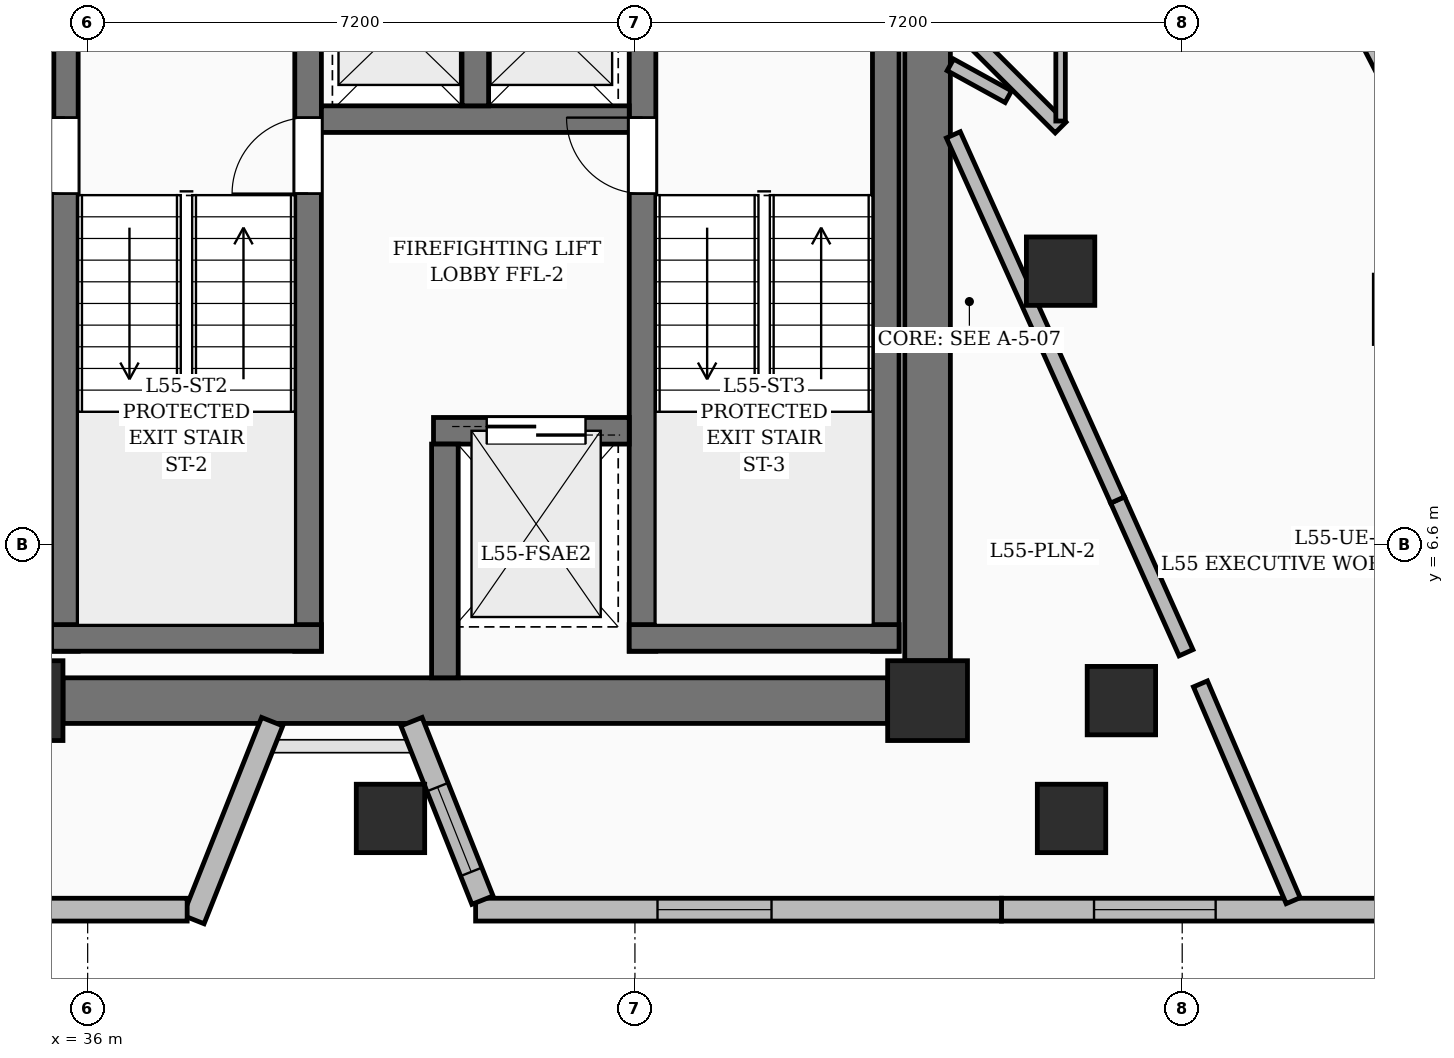
"""IFC4 building model, lengths in metres.
Left out: names, types, materials, properties, quantities, classifications, styles, units other than length and angle.
Written with IfcOpenShell. Run it as: python <this file> out.ifc"""

import sys

from ifc_helpers import new_model, si_unit, direction, frame, frame_2d, origin, origin_2d, place, context, subcontext, project, spatial, rectangle, extrude, element, fill, save


model = new_model("IFC4")
c1 = context("Model", 3, precision=1e-05, world=origin(), true_north=direction((0.0, 1.0)))
c2 = subcontext(c1, "Body", "Model", "MODEL_VIEW")
j1 = project(units=[si_unit("LENGTHUNIT", "METRE"), si_unit("PLANEANGLEUNIT", "RADIAN")], contexts=[c1])
p1 = place(None, origin())
s1 = spatial("IfcSite", under=j1, at=p1, CompositionType="ELEMENT")
p2 = place(p1, origin())
s2 = spatial("IfcBuilding", under=s1, at=p2, CompositionType="ELEMENT")
p3 = place(p2, frame((0.0, 0.0, 214.5)))
s3 = spatial("IfcBuildingStorey", under=s2, at=p3, CompositionType="ELEMENT", Elevation=214.5)
for number, where, z_axis, x_axis in (
    (1, (35.15, 4.55, 0.0), (0.0, 0.0, 1.0), (1.0, 0.0, 0.0)),
    (2, (47.05, 4.55, 0.0), (0.0, 0.0, 1.0), (1.0, 0.0, 0.0)),
):
    element("IfcColumn", number, at=place(p3, frame(where, z_axis=z_axis, x_axis=x_axis)), inside=s3, PredefinedType="COLUMN", context=c2, shape_type="SweptSolid", body=[
        extrude(rectangle(XDim=1.05, YDim=1.05, at=origin_2d()), origin(), (0.0, 0.0, 1.0), 3.75),
    ])
for number, where, z_axis, x_axis in (
    (3, (49.6, 4.55, 0.0), (0.0, 0.0, 1.0), (1.0, 0.0, 0.0)),
    (4, (48.8, 10.2, 0.0), (0.0, 0.0, 1.0), (1.0, 0.0, 0.0)),
):
    element("IfcColumn", number, at=place(p3, frame(where, z_axis=z_axis, x_axis=x_axis)), inside=s3, PredefinedType="COLUMN", context=c2, shape_type="SweptSolid", body=[
        extrude(rectangle(XDim=0.9, YDim=0.9, at=origin_2d()), origin(), (0.0, 0.0, 1.0), 3.75),
    ])
p4 = place(p3, frame((35.675, 4.55, 0.0), z_axis=(0.0, 0.0, 1.0), x_axis=(1.0, 0.0, 0.0)))
e5 = element("IfcWall", 5, at=p4, inside=s3, PredefinedType="SHEAR", context=c2, shape_type="SweptSolid", body=[
    extrude(rectangle(XDim=10.85, YDim=0.6, at=frame_2d((5.425, 0.0))), origin(), (0.0, 0.0, 1.0), 3.75),
])
p5 = place(p3, frame((47.05, 5.075, 0.0), z_axis=(0.0, 0.0, 1.0), x_axis=(0.0, 1.0, 0.0)))
e6 = element("IfcWall", 6, at=p5, inside=s3, PredefinedType="SHEAR", context=c2, shape_type="SweptSolid", body=[
    extrude(rectangle(XDim=9.15, YDim=0.6, at=frame_2d((4.575, 0.0))), origin(), (0.0, 0.0, 1.0), 3.75),
])
p6 = place(p3, frame((35.7, 5.2, 0.0), z_axis=(0.0, 0.0, 1.0), x_axis=(0.0, 1.0, 0.0)))
e7 = element("IfcWall", 7, at=p6, inside=s3, PredefinedType="SOLIDWALL", context=c2, shape_type="SweptSolid", body=[
    extrude(rectangle(XDim=9.25, YDim=0.35, at=frame_2d((4.625, 0.0))), origin(), (0.0, 0.0, 1.0), 3.75),
])
p7 = place(p6, frame((6.02, 0.0, 0.0)))
e8 = element("IfcOpeningElement", 8, at=p7, cuts=e7, PredefinedType="OPENING", context=c2, shape_type="SweptSolid", body=[
    extrude(rectangle(XDim=1.0, YDim=2.15, at=frame_2d((0.5, 1.075))), frame((0.0, 0.185, 0.0), z_axis=(0.0, -1.0, 0.0), x_axis=(1.0, 0.0, 0.0)), (0.0, 0.0, 1.0), 0.37),
])
p8 = place(p3, frame((38.9, 5.2, 0.0), z_axis=(0.0, 0.0, 1.0), x_axis=(0.0, 1.0, 0.0)))
e9 = element("IfcWall", 9, at=p8, inside=s3, PredefinedType="SOLIDWALL", context=c2, shape_type="SweptSolid", body=[
    extrude(rectangle(XDim=9.25, YDim=0.35, at=frame_2d((4.625, 0.0))), origin(), (0.0, 0.0, 1.0), 3.75),
])
p9 = place(p8, frame((6.02, 0.0, 0.0)))
e10 = element("IfcOpeningElement", 10, at=p9, cuts=e9, PredefinedType="OPENING", context=c2, shape_type="SweptSolid", body=[
    extrude(rectangle(XDim=1.0, YDim=2.15, at=frame_2d((0.5, 1.075))), frame((0.0, 0.185, 0.0), z_axis=(0.0, -1.0, 0.0), x_axis=(1.0, 0.0, 0.0)), (0.0, 0.0, 1.0), 0.37),
])
p10 = place(p3, frame((35.525, 5.375, 0.0), z_axis=(0.0, 0.0, 1.0), x_axis=(1.0, 0.0, 0.0)))
e11 = element("IfcWall", 11, at=p10, inside=s3, PredefinedType="SOLIDWALL", context=c2, shape_type="SweptSolid", body=[
    extrude(rectangle(XDim=3.55, YDim=0.35, at=frame_2d((1.775, 0.0))), origin(), (0.0, 0.0, 1.0), 3.75),
])
p11 = place(p3, frame((43.3, 5.2, 0.0), z_axis=(0.0, 0.0, 1.0), x_axis=(0.0, 1.0, 0.0)))
e12 = element("IfcWall", 12, at=p11, inside=s3, PredefinedType="SOLIDWALL", context=c2, shape_type="SweptSolid", body=[
    extrude(rectangle(XDim=9.25, YDim=0.35, at=frame_2d((4.625, 0.0))), origin(), (0.0, 0.0, 1.0), 3.75),
])
p12 = place(p11, frame((6.02, 0.0, 0.0)))
e13 = element("IfcOpeningElement", 13, at=p12, cuts=e12, PredefinedType="OPENING", context=c2, shape_type="SweptSolid", body=[
    extrude(rectangle(XDim=1.0, YDim=2.15, at=frame_2d((0.5, 1.075))), frame((0.0, 0.185, 0.0), z_axis=(0.0, -1.0, 0.0), x_axis=(1.0, 0.0, 0.0)), (0.0, 0.0, 1.0), 0.37),
])
p13 = place(p3, frame((46.5, 5.2, 0.0), z_axis=(0.0, 0.0, 1.0), x_axis=(0.0, 1.0, 0.0)))
e14 = element("IfcWall", 14, at=p13, inside=s3, PredefinedType="SOLIDWALL", context=c2, shape_type="SweptSolid", body=[
    extrude(rectangle(XDim=9.25, YDim=0.35, at=frame_2d((4.625, 0.0))), origin(), (0.0, 0.0, 1.0), 3.75),
])
p14 = place(p3, frame((43.125, 5.375, 0.0), z_axis=(0.0, 0.0, 1.0), x_axis=(1.0, 0.0, 0.0)))
e15 = element("IfcWall", 15, at=p14, inside=s3, PredefinedType="SOLIDWALL", context=c2, shape_type="SweptSolid", body=[
    extrude(rectangle(XDim=3.55, YDim=0.35, at=frame_2d((1.775, 0.0))), origin(), (0.0, 0.0, 1.0), 3.75),
])
p15 = place(p3, frame((40.55, 8.1, 0.0), z_axis=(0.0, 0.0, 1.0), x_axis=(1.0, 0.0, 0.0)))
e16 = element("IfcWall", 16, at=p15, inside=s3, PredefinedType="SOLIDWALL", context=c2, shape_type="SweptSolid", body=[
    extrude(rectangle(XDim=2.575, YDim=0.35, at=frame_2d((1.288, 0.0))), origin(), (0.0, 0.0, 1.0), 3.75),
])
p16 = place(p15, frame((0.7, 0.0, 0.0)))
e17 = element("IfcOpeningElement", 17, at=p16, cuts=e16, PredefinedType="OPENING", context=c2, shape_type="SweptSolid", body=[
    extrude(rectangle(XDim=1.3, YDim=2.25, at=frame_2d((0.65, 1.125))), frame((0.0, 0.185, 0.0), z_axis=(0.0, -1.0, 0.0), x_axis=(1.0, 0.0, 0.0)), (0.0, 0.0, 1.0), 0.37),
])
p17 = place(p3, frame((40.7, 4.85, 0.0), z_axis=(0.0, 0.0, 1.0), x_axis=(0.0, 1.0, 0.0)))
e18 = element("IfcWall", 18, at=p17, inside=s3, PredefinedType="SOLIDWALL", context=c2, shape_type="SweptSolid", body=[
    extrude(rectangle(XDim=3.075, YDim=0.35, at=frame_2d((1.538, 0.0))), origin(), (0.0, 0.0, 1.0), 3.75),
])
p18 = place(p3, frame((39.075, 12.2, 0.0), z_axis=(0.0, 0.0, 1.0), x_axis=(1.0, 0.0, 0.0)))
e19 = element("IfcWall", 19, at=p18, inside=s3, PredefinedType="SOLIDWALL", context=c2, shape_type="SweptSolid", body=[
    extrude(rectangle(XDim=4.05, YDim=0.35, at=frame_2d((2.025, 0.0))), origin(), (0.0, 0.0, 1.0), 3.75),
])
p19 = place(p3, frame((41.1, 12.375, 0.0), z_axis=(0.0, 0.0, 1.0), x_axis=(0.0, 1.0, 0.0)))
e20 = element("IfcWall", 20, at=p19, inside=s3, PredefinedType="SOLIDWALL", context=c2, shape_type="SweptSolid", body=[
    extrude(rectangle(XDim=2.075, YDim=0.35, at=frame_2d((1.038, 0.0))), origin(), (0.0, 0.0, 1.0), 3.75),
])
for number, where, z_axis, x_axis in (
    (21, (39.984, 3.0, 0.0), (0.0, 0.0, 1.0), (1.0, 0.0, 0.0)),
    (22, (48.944, 3.0, 0.0), (0.0, 0.0, 1.0), (1.0, 0.0, 0.0)),
    (23, (53.377, 9.698, 0.0), (0.0, 0.0, 1.0), (1.0, 0.0, 0.0)),
):
    element("IfcColumn", number, at=place(p3, frame(where, z_axis=z_axis, x_axis=x_axis)), inside=s3, PredefinedType="COLUMN", context=c2, shape_type="SweptSolid", body=[
        extrude(rectangle(XDim=0.9, YDim=0.9, at=origin_2d()), origin(), (0.0, 0.0, 1.0), 3.75),
    ])
p20 = place(p3, frame((51.288, 16.369, 0.0), z_axis=(0.0, 0.0, 1.0), x_axis=(0.458306446078, -0.88879424024, 0.0)))
e24 = element("IfcWall", 24, at=p20, inside=s3, PredefinedType="SOLIDWALL", context=c2, shape_type="SweptSolid", body=[
    extrude(rectangle(XDim=6.266, YDim=0.3, at=frame_2d((3.133, 0.0))), origin(), (0.0, 0.0, 1.0), 3.5),
])
p21 = place(p20, frame((2.975, 0.0, 0.55)))
e25 = element("IfcOpeningElement", 25, at=p21, cuts=e24, PredefinedType="OPENING", context=c2, shape_type="SweptSolid", body=[
    extrude(rectangle(XDim=1.6, YDim=2.2, at=frame_2d((0.8, 1.1))), frame((0.0, 0.16, 0.0), z_axis=(0.0, -1.0, 0.0), x_axis=(1.0, 0.0, 0.0)), (0.0, 0.0, 1.0), 0.32),
])
p22 = place(p3, frame((54.36, 1.8, 0.0), z_axis=(0.0, 0.0, 1.0), x_axis=(-1.0, 0.0, 0.0)))
e26 = element("IfcWall", 26, at=p22, inside=s3, PredefinedType="SOLIDWALL", context=c2, shape_type="SweptSolid", body=[
    extrude(rectangle(XDim=6.338, YDim=0.3, at=frame_2d((3.169, 0.0))), origin(), (0.0, 0.0, 1.0), 3.5),
])
p23 = place(p22, frame((3.52, 0.0, 0.55)))
e27 = element("IfcOpeningElement", 27, at=p23, cuts=e26, PredefinedType="OPENING", context=c2, shape_type="SweptSolid", body=[
    extrude(rectangle(XDim=1.6, YDim=2.2, at=frame_2d((0.8, 1.1))), frame((0.0, 0.16, 0.0), z_axis=(0.0, -1.0, 0.0), x_axis=(1.0, 0.0, 0.0)), (0.0, 0.0, 1.0), 0.32),
])
p24 = place(p3, frame((48.022, 1.8, 0.0), z_axis=(0.0, 0.0, 1.0), x_axis=(-1.0, 0.0, 0.0)))
e28 = element("IfcWall", 28, at=p24, inside=s3, PredefinedType="SOLIDWALL", context=c2, shape_type="SweptSolid", body=[
    extrude(rectangle(XDim=6.918, YDim=0.3, at=frame_2d((3.459, 0.0))), origin(), (0.0, 0.0, 1.0), 3.5),
])
p25 = place(p24, frame((3.025, 0.0, 0.6)))
e29 = element("IfcOpeningElement", 29, at=p25, cuts=e28, PredefinedType="OPENING", context=c2, shape_type="SweptSolid", body=[
    extrude(rectangle(XDim=1.5, YDim=2.1, at=frame_2d((0.75, 1.05))), frame((0.0, 0.16, 0.0), z_axis=(0.0, -1.0, 0.0), x_axis=(1.0, 0.0, 0.0)), (0.0, 0.0, 1.0), 0.32),
])
p26 = place(p3, frame((41.194, 1.925, 0.0), z_axis=(0.0, 0.0, 1.0), x_axis=(-0.369457562636, 0.929247603931, 0.0)))
e30 = element("IfcWall", 30, at=p26, inside=s3, PredefinedType="SOLIDWALL", context=c2, shape_type="SweptSolid", body=[
    extrude(rectangle(XDim=2.527, YDim=0.3, at=frame_2d((1.263, 0.0))), origin(), (0.0, 0.0, 1.0), 2.825),
])
p27 = place(p26, frame((0.4, 0.0, 0.8)))
e31 = element("IfcOpeningElement", 31, at=p27, cuts=e30, PredefinedType="OPENING", context=c2, shape_type="SweptSolid", body=[
    extrude(rectangle(XDim=1.2, YDim=1.8, at=frame_2d((0.6, 0.9))), frame((0.0, 0.16, 0.0), z_axis=(0.0, -1.0, 0.0), x_axis=(1.0, 0.0, 0.0)), (0.0, 0.0, 1.0), 0.32),
])
p28 = place(p3, frame((38.427, 4.273, 0.0), z_axis=(0.0, 0.0, 1.0), x_axis=(-0.369466825356, -0.929243921132, 0.0)))
e32 = element("IfcWall", 32, at=p28, inside=s3, PredefinedType="SOLIDWALL", context=c2, shape_type="SweptSolid", body=[
    extrude(rectangle(XDim=2.802, YDim=0.3, at=frame_2d((1.401, 0.0))), origin(), (0.0, 0.0, 1.0), 2.69),
])
p29 = place(p3, frame((37.309, 1.8, 0.0), z_axis=(0.0, 0.0, 1.0), x_axis=(-1.0, 0.0, 0.0)))
e33 = element("IfcWall", 33, at=p29, inside=s3, PredefinedType="SOLIDWALL", context=c2, shape_type="SweptSolid", body=[
    extrude(rectangle(XDim=6.3, YDim=0.3, at=frame_2d((3.15, 0.0))), origin(), (0.0, 0.0, 1.0), 3.5),
])
p30 = place(p29, frame((4.4, 0.0, 0.8)))
e34 = element("IfcOpeningElement", 34, at=p30, cuts=e33, PredefinedType="OPENING", context=c2, shape_type="SweptSolid", body=[
    extrude(rectangle(XDim=1.2, YDim=1.8, at=frame_2d((0.6, 0.9))), frame((0.0, 0.16, 0.0), z_axis=(0.0, -1.0, 0.0), x_axis=(1.0, 0.0, 0.0)), (0.0, 0.0, 1.0), 0.32),
])
p31 = place(p3, frame((35.48, 12.22, 0.0), z_axis=(0.0, 0.0, 1.0), x_axis=(0.0, 1.0, 0.0)))
e35 = element("IfcWall", 35, at=p31, inside=s3, PredefinedType="PARTITIONING", context=c2, shape_type="SweptSolid", body=[
    extrude(rectangle(XDim=2.396, YDim=0.15, at=frame_2d((1.198, 0.0))), origin(), (0.0, 0.0, 1.0), 3.5),
])
p32 = place(p3, frame((50.45, 5.18, 0.0), z_axis=(0.0, 0.0, 1.0), x_axis=(-0.408626143047, 0.912701854506, 0.0)))
e36 = element("IfcWall", 36, at=p32, inside=s3, PredefinedType="PARTITIONING", context=c2, shape_type="SweptSolid", body=[
    extrude(rectangle(XDim=2.202, YDim=0.2, at=frame_2d((1.101, 0.0))), origin(), (0.0, 0.0, 1.0), 2.82),
])
p33 = place(p3, frame((51.86, 1.918, 0.0), z_axis=(0.0, 0.0, 1.0), x_axis=(-0.393349316575, 0.919389098886, 0.0)))
e37 = element("IfcWall", 37, at=p33, inside=s3, PredefinedType="PARTITIONING", context=c2, shape_type="SweptSolid", body=[
    extrude(rectangle(XDim=3.102, YDim=0.2, at=frame_2d((1.551, 0.0))), origin(), (0.0, 0.0, 1.0), 3.5),
])
p34 = place(p3, frame((49.55, 7.19, 0.0), z_axis=(0.0, 0.0, 1.0), x_axis=(-0.410297221829, 0.91195185715, 0.0)))
e38 = element("IfcWall", 38, at=p34, inside=s3, PredefinedType="PARTITIONING", context=c2, shape_type="SweptSolid", body=[
    extrude(rectangle(XDim=5.267, YDim=0.2, at=frame_2d((2.634, 0.0))), origin(), (0.0, 0.0, 1.0), 2.685),
])
p35 = place(p3, frame((48.8, 12.09, 0.0), z_axis=(0.0, 0.0, 1.0), x_axis=(-0.707106781187, 0.707106781187, 0.0)))
e39 = element("IfcWall", 39, at=p35, inside=s3, PredefinedType="PARTITIONING", context=c2, shape_type="SweptSolid", body=[
    extrude(rectangle(XDim=2.051, YDim=0.2, at=frame_2d((1.025, 0.0))), origin(), (0.0, 0.0, 1.0), 3.5),
])
p36 = place(p3, frame((48.8, 12.175, 0.0), z_axis=(0.0, 0.0, 1.0), x_axis=(0.0, 1.0, 0.0)))
e40 = element("IfcWall", 40, at=p36, inside=s3, PredefinedType="PARTITIONING", context=c2, shape_type="SweptSolid", body=[
    extrude(rectangle(XDim=2.415, YDim=0.125, at=frame_2d((1.208, 0.0))), origin(), (0.0, 0.0, 1.0), 2.859),
])
p37 = place(p36, frame((0.979, 0.0, 0.0)))
e41 = element("IfcOpeningElement", 41, at=p37, cuts=e40, PredefinedType="OPENING", context=c2, shape_type="SweptSolid", body=[
    extrude(rectangle(XDim=0.95, YDim=2.2, at=frame_2d((0.475, 1.1))), frame((0.0, 0.072, 0.0), z_axis=(0.0, -1.0, 0.0), x_axis=(1.0, 0.0, 0.0)), (0.0, 0.0, 1.0), 0.145),
])
p38 = place(p3, frame((47.35, 12.914, 0.0), z_axis=(0.0, 0.0, 1.0), x_axis=(0.876281108122, -0.481800186331, 0.0)))
e42 = element("IfcWall", 42, at=p38, inside=s3, PredefinedType="PARTITIONING", context=c2, shape_type="SweptSolid", body=[
    extrude(rectangle(XDim=0.87, YDim=0.175, at=frame_2d((0.435, 0.0))), origin(), (0.0, 0.0, 1.0), 3.5),
])
p39 = place(p21, origin())
e43 = element("IfcWindow", 43, at=p39, inside=s3, PartitioningType="SINGLE_PANEL", PredefinedType="WINDOW", context=c2, shape_type="SweptSolid", body=[
    extrude(rectangle(XDim=1.6, YDim=2.2, at=frame_2d((0.8, 1.1))), frame((0.0, 0.03, 0.0), z_axis=(0.0, -1.0, 0.0), x_axis=(1.0, 0.0, 0.0)), (0.0, 0.0, 1.0), 0.06),
])
fill(e25, e43)
p40 = place(p23, origin())
e44 = element("IfcWindow", 44, at=p40, inside=s3, PartitioningType="SINGLE_PANEL", PredefinedType="WINDOW", context=c2, shape_type="SweptSolid", body=[
    extrude(rectangle(XDim=1.6, YDim=2.2, at=frame_2d((0.8, 1.1))), frame((0.0, 0.03, 0.0), z_axis=(0.0, -1.0, 0.0), x_axis=(1.0, 0.0, 0.0)), (0.0, 0.0, 1.0), 0.06),
])
fill(e27, e44)
p41 = place(p25, origin())
e45 = element("IfcWindow", 45, at=p41, inside=s3, PartitioningType="SINGLE_PANEL", PredefinedType="WINDOW", context=c2, shape_type="SweptSolid", body=[
    extrude(rectangle(XDim=1.5, YDim=2.1, at=frame_2d((0.75, 1.05))), frame((0.0, 0.03, 0.0), z_axis=(0.0, -1.0, 0.0), x_axis=(1.0, 0.0, 0.0)), (0.0, 0.0, 1.0), 0.06),
])
fill(e29, e45)
p42 = place(p27, origin())
e46 = element("IfcWindow", 46, at=p42, inside=s3, PartitioningType="SINGLE_PANEL", PredefinedType="WINDOW", context=c2, shape_type="SweptSolid", body=[
    extrude(rectangle(XDim=1.2, YDim=1.8, at=frame_2d((0.6, 0.9))), frame((0.0, 0.03, 0.0), z_axis=(0.0, -1.0, 0.0), x_axis=(1.0, 0.0, 0.0)), (0.0, 0.0, 1.0), 0.06),
])
fill(e31, e46)
p43 = place(p7, origin())
e47 = element("IfcDoor", 47, at=p43, inside=s3, OperationType="SINGLE_SWING_RIGHT", PredefinedType="DOOR", context=c2, shape_type="SweptSolid", body=[
    extrude(rectangle(XDim=1.0, YDim=2.15, at=frame_2d((0.5, 1.075))), frame((0.0, 0.025, 0.0), z_axis=(0.0, -1.0, 0.0), x_axis=(1.0, 0.0, 0.0)), (0.0, 0.0, 1.0), 0.05),
])
fill(e8, e47)
p44 = place(p9, origin())
e48 = element("IfcDoor", 48, at=p44, inside=s3, OperationType="SINGLE_SWING_LEFT", PredefinedType="DOOR", context=c2, shape_type="SweptSolid", body=[
    extrude(rectangle(XDim=1.0, YDim=2.15, at=frame_2d((0.5, 1.075))), frame((0.0, 0.025, 0.0), z_axis=(0.0, -1.0, 0.0), x_axis=(1.0, 0.0, 0.0)), (0.0, 0.0, 1.0), 0.05),
])
fill(e10, e48)
p45 = place(p12, origin())
e49 = element("IfcDoor", 49, at=p45, inside=s3, OperationType="SINGLE_SWING_RIGHT", PredefinedType="DOOR", context=c2, shape_type="SweptSolid", body=[
    extrude(rectangle(XDim=1.0, YDim=2.15, at=frame_2d((0.5, 1.075))), frame((0.0, 0.025, 0.0), z_axis=(0.0, -1.0, 0.0), x_axis=(1.0, 0.0, 0.0)), (0.0, 0.0, 1.0), 0.05),
])
fill(e13, e49)
p46 = place(p16, origin())
e50 = element("IfcDoor", 50, at=p46, inside=s3, OperationType="DOUBLE_DOOR_SLIDING", PredefinedType="DOOR", context=c2, shape_type="SweptSolid", body=[
    extrude(rectangle(XDim=1.3, YDim=2.25, at=frame_2d((0.65, 1.125))), frame((0.0, 0.025, 0.0), z_axis=(0.0, -1.0, 0.0), x_axis=(1.0, 0.0, 0.0)), (0.0, 0.0, 1.0), 0.05),
])
fill(e17, e50)
save(model, sys.argv[1])
